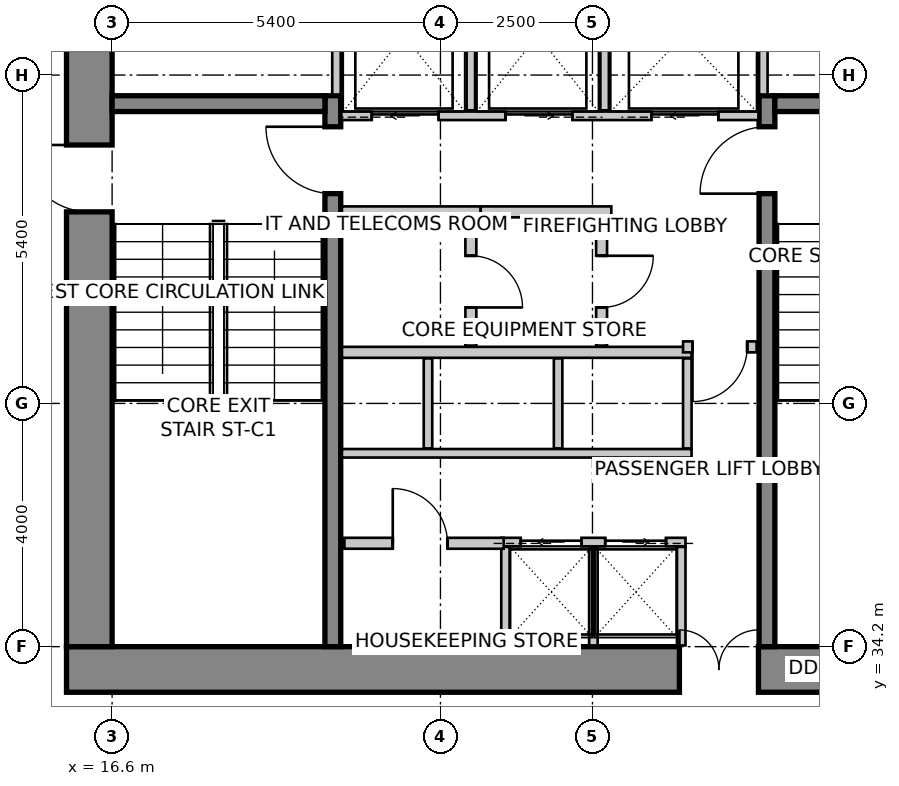
"""IFC4 building model, lengths in metres.
Left out: names, types, materials, properties, quantities, classifications, styles, units other than length and angle.
Written with IfcOpenShell. Run it as: python <this file> out.ifc"""

import sys

from ifc_helpers import new_model, si_unit, direction, frame, frame_2d, origin, place, context, subcontext, project, spatial, rectangle, extrude, source, transform, mapped, element, fill, save


model = new_model("IFC4")
c1 = context("Model", 3, precision=1e-05, world=origin(), true_north=direction((0.0, 1.0)))
c2 = subcontext(c1, "Body", "Model", "MODEL_VIEW")
j1 = project(units=[si_unit("LENGTHUNIT", "METRE"), si_unit("PLANEANGLEUNIT", "RADIAN")], contexts=[c1])
p1 = place(None, origin())
s1 = spatial("IfcSite", under=j1, at=p1, CompositionType="ELEMENT")
p2 = place(p1, origin())
s2 = spatial("IfcBuilding", under=s1, at=p2, CompositionType="ELEMENT")
p3 = place(p2, frame((0.0, 0.0, 114.2)))
s3 = spatial("IfcBuildingStorey", under=s2, at=p3, CompositionType="ELEMENT", Elevation=114.2)
p4 = place(p3, frame((15.85, 33.825, 0.0), z_axis=(0.0, 0.0, 1.0), x_axis=(1.0, 0.0, 0.0)))
e1 = element("IfcWall", 1, at=p4, inside=s3, PredefinedType="SHEAR", context=c2, shape_type="SweptSolid", body=[
    extrude(rectangle(XDim=15.9, YDim=0.75, at=frame_2d((7.95, 0.0))), origin(), (0.0, 0.0, 1.0), 3.6),
])
m1 = source(origin(), c2, "Body", "SweptSolid", [
    extrude(rectangle(XDim=1.3, YDim=2.15, at=frame_2d((0.65, 1.075))), frame((0.0, 0.385, 0.0), z_axis=(0.0, -1.0, 0.0), x_axis=(1.0, 0.0, 0.0)), (0.0, 0.0, 1.0), 0.77),
])
p5 = place(p4, frame((10.08, 0.0, 0.0)))
e2 = element("IfcOpeningElement", 2, at=p5, cuts=e1, PredefinedType="OPENING", context=c2, shape_type="MappedRepresentation", body=[
    mapped(m1, transform((0.0, 0.0, 0.0), scale=1.0)),
])
p6 = place(p3, frame((16.225, 34.2, 0.0), z_axis=(0.0, 0.0, 1.0), x_axis=(0.0, 1.0, 0.0)))
e3 = element("IfcWall", 3, at=p6, inside=s3, PredefinedType="SHEAR", context=c2, shape_type="SweptSolid", body=[
    extrude(rectangle(XDim=11.4, YDim=0.75, at=frame_2d((5.7, 0.0))), origin(), (0.0, 0.0, 1.0), 3.6),
])
m2 = source(origin(), c2, "Body", "SweptSolid", [
    extrude(rectangle(XDim=1.1, YDim=2.15, at=frame_2d((0.55, 1.075))), frame((0.0, 0.385, 0.0), z_axis=(0.0, -1.0, 0.0), x_axis=(1.0, 0.0, 0.0)), (0.0, 0.0, 1.0), 0.77),
])
p7 = place(p6, frame((7.15, 0.0, 0.0)))
e4 = element("IfcOpeningElement", 4, at=p7, cuts=e3, PredefinedType="OPENING", context=c2, shape_type="MappedRepresentation", body=[
    mapped(m2, transform((0.0, 0.0, 0.0), scale=1.0)),
])
p8 = place(p3, frame((20.23, 34.2, 0.0), z_axis=(0.0, 0.0, 1.0), x_axis=(0.0, 1.0, 0.0)))
e5 = element("IfcWall", 5, at=p8, inside=s3, PredefinedType="SHEAR", context=c2, shape_type="SweptSolid", body=[
    extrude(rectangle(XDim=9.06, YDim=0.26, at=frame_2d((4.53, 0.0))), origin(), (0.0, 0.0, 1.0), 3.6),
])
m3 = source(origin(), c2, "Body", "SweptSolid", [
    extrude(rectangle(XDim=1.1, YDim=2.15, at=frame_2d((0.55, 1.075))), frame((0.0, 0.14, 0.0), z_axis=(0.0, -1.0, 0.0), x_axis=(1.0, 0.0, 0.0)), (0.0, 0.0, 1.0), 0.28),
])
p9 = place(p8, frame((7.45, 0.0, 0.0)))
e6 = element("IfcOpeningElement", 6, at=p9, cuts=e5, PredefinedType="OPENING", context=c2, shape_type="MappedRepresentation", body=[
    mapped(m3, transform((0.0, 0.0, 0.0), scale=1.0)),
])
p10 = place(p3, frame((27.37, 34.2, 0.0), z_axis=(0.0, 0.0, 1.0), x_axis=(0.0, 1.0, 0.0)))
e7 = element("IfcWall", 7, at=p10, inside=s3, PredefinedType="SHEAR", context=c2, shape_type="SweptSolid", body=[
    extrude(rectangle(XDim=9.06, YDim=0.26, at=frame_2d((4.53, 0.0))), origin(), (0.0, 0.0, 1.0), 3.6),
])
p11 = place(p10, frame((7.45, 0.0, 0.0)))
e8 = element("IfcOpeningElement", 8, at=p11, cuts=e7, PredefinedType="OPENING", context=c2, shape_type="MappedRepresentation", body=[
    mapped(m3, transform((0.0, 0.0, 0.0), scale=1.0)),
])
for number, where, z_axis, x_axis in (
    (9, (16.6, 43.13, 0.0), (0.0, 0.0, 1.0), (1.0, 0.0, 0.0)),
    (10, (27.5, 43.13, 0.0), (0.0, 0.0, 1.0), (1.0, 0.0, 0.0)),
):
    element("IfcWall", number, at=place(p3, frame(where, z_axis=z_axis, x_axis=x_axis)), inside=s3, PredefinedType="SHEAR", context=c2, shape_type="SweptSolid", body=[
        extrude(rectangle(XDim=3.5, YDim=0.26, at=frame_2d((1.75, 0.0))), origin(), (0.0, 0.0, 1.0), 3.6),
    ])
p12 = place(p3, frame((20.37, 42.93, 0.0), z_axis=(0.0, 0.0, 1.0), x_axis=(1.0, 0.0, 0.0)))
e11 = element("IfcWall", 11, at=p12, inside=s3, PredefinedType="SOLIDWALL", context=c2, shape_type="SweptSolid", body=[
    extrude(rectangle(XDim=6.86, YDim=0.14, at=frame_2d((3.43, 0.0))), origin(), (0.0, 0.0, 1.0), 3.35),
])
m4 = source(origin(), c2, "Body", "SweptSolid", [
    extrude(rectangle(XDim=1.1, YDim=2.15, at=frame_2d((0.55, 1.075))), frame((0.0, 0.08, 0.0), z_axis=(0.0, -1.0, 0.0), x_axis=(1.0, 0.0, 0.0)), (0.0, 0.0, 1.0), 0.16),
])
p13 = place(p12, frame((0.5, 0.0, 0.0)))
e12 = element("IfcOpeningElement", 12, at=p13, cuts=e11, PredefinedType="OPENING", context=c2, shape_type="MappedRepresentation", body=[
    mapped(m4, transform((0.0, 0.0, 0.0), scale=1.0)),
])
p14 = place(p12, frame((2.7, 0.0, 0.0)))
e13 = element("IfcOpeningElement", 13, at=p14, cuts=e11, PredefinedType="OPENING", context=c2, shape_type="MappedRepresentation", body=[
    mapped(m4, transform((0.0, 0.0, 0.0), scale=1.0)),
])
p15 = place(p12, frame((5.1, 0.0, 0.0)))
e14 = element("IfcOpeningElement", 14, at=p15, cuts=e11, PredefinedType="OPENING", context=c2, shape_type="MappedRepresentation", body=[
    mapped(m4, transform((0.0, 0.0, 0.0), scale=1.0)),
])
for number, where, z_axis, x_axis in (
    (15, (20.29, 43.28, 0.0), (0.0, 0.0, 1.0), (0.0, 1.0, 0.0)),
    (16, (27.31, 43.28, 0.0), (0.0, 0.0, 1.0), (0.0, 1.0, 0.0)),
):
    element("IfcWall", number, at=place(p3, frame(where, z_axis=z_axis, x_axis=x_axis)), inside=s3, PredefinedType="SOLIDWALL", context=c2, shape_type="SweptSolid", body=[
        extrude(rectangle(XDim=2.3, YDim=0.14, at=frame_2d((1.15, 0.0))), origin(), (0.0, 0.0, 1.0), 3.35),
    ])
for number, where, z_axis, x_axis in (
    (17, (22.5, 43.02, 0.0), (0.0, 0.0, 1.0), (0.0, 1.0, 0.0)),
    (18, (24.7, 43.02, 0.0), (0.0, 0.0, 1.0), (0.0, 1.0, 0.0)),
):
    element("IfcWall", number, at=place(p3, frame(where, z_axis=z_axis, x_axis=x_axis)), inside=s3, PredefinedType="SOLIDWALL", context=c2, shape_type="SweptSolid", body=[
        extrude(rectangle(XDim=2.56, YDim=0.14, at=frame_2d((1.28, 0.0))), origin(), (0.0, 0.0, 1.0), 3.35),
    ])
p16 = place(p3, frame((23.0, 35.92, 0.0), z_axis=(0.0, 0.0, 1.0), x_axis=(1.0, 0.0, 0.0)))
e19 = element("IfcWall", 19, at=p16, inside=s3, PredefinedType="SOLIDWALL", context=c2, shape_type="SweptSolid", body=[
    extrude(rectangle(XDim=3.03, YDim=0.14, at=frame_2d((1.515, 0.0))), origin(), (0.0, 0.0, 1.0), 3.35),
])
m5 = source(origin(), c2, "Body", "SweptSolid", [
    extrude(rectangle(XDim=1.0, YDim=2.15, at=frame_2d((0.5, 1.075))), frame((0.0, 0.08, 0.0), z_axis=(0.0, -1.0, 0.0), x_axis=(1.0, 0.0, 0.0)), (0.0, 0.0, 1.0), 0.16),
])
p17 = place(p16, frame((0.32, 0.0, 0.0)))
e20 = element("IfcOpeningElement", 20, at=p17, cuts=e19, PredefinedType="OPENING", context=c2, shape_type="MappedRepresentation", body=[
    mapped(m5, transform((0.0, 0.0, 0.0), scale=1.0)),
])
p18 = place(p16, frame((1.71, 0.0, 0.0)))
e21 = element("IfcOpeningElement", 21, at=p18, cuts=e19, PredefinedType="OPENING", context=c2, shape_type="MappedRepresentation", body=[
    mapped(m5, transform((0.0, 0.0, 0.0), scale=1.0)),
])
for number, where, z_axis, x_axis in (
    (22, (25.96, 34.22, 0.0), (0.0, 0.0, 1.0), (0.0, 1.0, 0.0)),
    (23, (23.07, 34.22, 0.0), (0.0, 0.0, 1.0), (0.0, 1.0, 0.0)),
    (24, (24.515, 34.22, 0.0), (0.0, 0.0, 1.0), (0.0, 1.0, 0.0)),
):
    element("IfcWall", number, at=place(p3, frame(where, z_axis=z_axis, x_axis=x_axis)), inside=s3, PredefinedType="SOLIDWALL", context=c2, shape_type="SweptSolid", body=[
        extrude(rectangle(XDim=1.62, YDim=0.14, at=frame_2d((0.81, 0.0))), origin(), (0.0, 0.0, 1.0), 2.642),
    ])
p19 = place(p3, frame((20.38, 37.38, 0.0), z_axis=(0.0, 0.0, 1.0), x_axis=(1.0, 0.0, 0.0)))
e25 = element("IfcWall", 25, at=p19, inside=s3, PredefinedType="SOLIDWALL", context=c2, shape_type="SweptSolid", body=[
    extrude(rectangle(XDim=5.75, YDim=0.14, at=frame_2d((2.875, 0.0))), origin(), (0.0, 0.0, 1.0), 3.35),
])
p20 = place(p3, frame((20.38, 39.04, 0.0), z_axis=(0.0, 0.0, 1.0), x_axis=(1.0, 0.0, 0.0)))
e26 = element("IfcWall", 26, at=p20, inside=s3, PredefinedType="SOLIDWALL", context=c2, shape_type="SweptSolid", body=[
    extrude(rectangle(XDim=5.75, YDim=0.18, at=frame_2d((2.875, 0.0))), origin(), (0.0, 0.0, 1.0), 3.35),
])
for number, where, z_axis, x_axis in (
    (27, (26.06, 37.46, 0.0), (0.0, 0.0, 1.0), (0.0, 1.0, 0.0)),
    (28, (21.795, 37.46, 0.0), (0.0, 0.0, 1.0), (0.0, 1.0, 0.0)),
    (29, (23.935, 37.46, 0.0), (0.0, 0.0, 1.0), (0.0, 1.0, 0.0)),
):
    element("IfcWall", number, at=place(p3, frame(where, z_axis=z_axis, x_axis=x_axis)), inside=s3, PredefinedType="SOLIDWALL", context=c2, shape_type="SweptSolid", body=[
        extrude(rectangle(XDim=1.48, YDim=0.14, at=frame_2d((0.74, 0.0))), origin(), (0.0, 0.0, 1.0), 3.35),
    ])
p21 = place(p3, frame((22.66, 41.35, 0.0), z_axis=(0.0, 0.0, 1.0), x_axis=(-1.0, 0.0, 0.0)))
e30 = element("IfcWall", 30, at=p21, inside=s3, PredefinedType="PARTITIONING", context=c2, shape_type="SweptSolid", body=[
    extrude(rectangle(XDim=2.28, YDim=0.18, at=frame_2d((1.14, 0.0))), origin(), (0.0, 0.0, 1.0), 3.35),
])
p22 = place(p3, frame((24.81, 41.35, 0.0), z_axis=(0.0, 0.0, 1.0), x_axis=(-1.0, 0.0, 0.0)))
e31 = element("IfcWall", 31, at=p22, inside=s3, PredefinedType="PARTITIONING", context=c2, shape_type="SweptSolid", body=[
    extrude(rectangle(XDim=2.148, YDim=0.18, at=frame_2d((1.074, 0.0))), origin(), (0.0, 0.0, 1.0), 3.35),
])
p23 = place(p3, frame((22.5, 41.256, 0.0), z_axis=(0.0, 0.0, 1.0), x_axis=(0.0, -1.0, 0.0)))
e32 = element("IfcWall", 32, at=p23, inside=s3, PredefinedType="PARTITIONING", context=c2, shape_type="SweptSolid", body=[
    extrude(rectangle(XDim=2.106, YDim=0.18, at=frame_2d((1.053, 0.0))), origin(), (0.0, 0.0, 1.0), 3.35),
])
m6 = source(origin(), c2, "Body", "SweptSolid", [
    extrude(rectangle(XDim=0.85, YDim=2.15, at=frame_2d((0.425, 1.075))), frame((0.0, 0.1, 0.0), z_axis=(0.0, -1.0, 0.0), x_axis=(1.0, 0.0, 0.0)), (0.0, 0.0, 1.0), 0.2),
])
p24 = place(p23, frame((0.628, 0.0, 0.0)))
e33 = element("IfcOpeningElement", 33, at=p24, cuts=e32, PredefinedType="OPENING", context=c2, shape_type="MappedRepresentation", body=[
    mapped(m6, transform((0.0, 0.0, 0.0), scale=1.0)),
])
p25 = place(p3, frame((24.65, 41.256, 0.0), z_axis=(0.0, 0.0, 1.0), x_axis=(0.0, -1.0, 0.0)))
e34 = element("IfcWall", 34, at=p25, inside=s3, PredefinedType="PARTITIONING", context=c2, shape_type="SweptSolid", body=[
    extrude(rectangle(XDim=2.106, YDim=0.18, at=frame_2d((1.053, 0.0))), origin(), (0.0, 0.0, 1.0), 3.35),
])
p26 = place(p25, frame((0.628, 0.0, 0.0)))
e35 = element("IfcOpeningElement", 35, at=p26, cuts=e34, PredefinedType="OPENING", context=c2, shape_type="MappedRepresentation", body=[
    mapped(m6, transform((0.0, 0.0, 0.0), scale=1.0)),
])
p27 = place(p3, frame((27.2, 39.13, 0.0), z_axis=(0.0, 0.0, 1.0), x_axis=(-1.0, 0.0, 0.0)))
e36 = element("IfcWall", 36, at=p27, inside=s3, PredefinedType="PARTITIONING", context=c2, shape_type="SweptSolid", body=[
    extrude(rectangle(XDim=1.21, YDim=0.18, at=frame_2d((0.605, 0.0))), origin(), (0.0, 0.0, 1.0), 3.35),
])
m7 = source(origin(), c2, "Body", "SweptSolid", [
    extrude(rectangle(XDim=0.9, YDim=2.15, at=frame_2d((0.45, 1.075))), frame((0.0, 0.1, 0.0), z_axis=(0.0, -1.0, 0.0), x_axis=(1.0, 0.0, 0.0)), (0.0, 0.0, 1.0), 0.2),
])
p28 = place(p27, frame((0.155, 0.0, 0.0)))
e37 = element("IfcOpeningElement", 37, at=p28, cuts=e36, PredefinedType="OPENING", context=c2, shape_type="MappedRepresentation", body=[
    mapped(m7, transform((0.0, 0.0, 0.0), scale=1.0)),
])
p29 = place(p3, frame((20.42, 35.9, 0.0), z_axis=(0.0, 0.0, 1.0), x_axis=(1.0, 0.0, 0.0)))
e38 = element("IfcWall", 38, at=p29, inside=s3, PredefinedType="PARTITIONING", context=c2, shape_type="SweptSolid", body=[
    extrude(rectangle(XDim=2.62, YDim=0.18, at=frame_2d((1.31, 0.0))), origin(), (0.0, 0.0, 1.0), 3.35),
])
p30 = place(p29, frame((0.796, 0.0, 0.0)))
e39 = element("IfcOpeningElement", 39, at=p30, cuts=e38, PredefinedType="OPENING", context=c2, shape_type="MappedRepresentation", body=[
    mapped(m7, transform((0.0, 0.0, 0.0), scale=1.0)),
])
m8 = source(origin(), c2, "Body", "SweptSolid", [
    extrude(rectangle(XDim=1.1, YDim=2.15, at=frame_2d((0.55, 1.075))), frame((0.0, 0.025, 0.0), z_axis=(0.0, -1.0, 0.0), x_axis=(1.0, 0.0, 0.0)), (0.0, 0.0, 1.0), 0.05),
])
p31 = place(p13, origin())
e40 = element("IfcDoor", 40, at=p31, inside=s3, OperationType="SLIDING_TO_LEFT", PredefinedType="DOOR", context=c2, shape_type="MappedRepresentation", body=[
    mapped(m8, transform((0.0, 0.0, 0.0), scale=1.0)),
])
fill(e12, e40)
p32 = place(p14, origin())
e41 = element("IfcDoor", 41, at=p32, inside=s3, OperationType="SLIDING_TO_RIGHT", PredefinedType="DOOR", context=c2, shape_type="MappedRepresentation", body=[
    mapped(m8, transform((0.0, 0.0, 0.0), scale=1.0)),
])
fill(e13, e41)
m9 = source(origin(), c2, "Body", "SweptSolid", [
    extrude(rectangle(XDim=1.1, YDim=2.15, at=frame_2d((0.55, 1.075))), frame((0.0, 0.025, 0.0), z_axis=(0.0, -1.0, 0.0), x_axis=(1.0, 0.0, 0.0)), (0.0, 0.0, 1.0), 0.05),
])
p33 = place(p15, origin())
e42 = element("IfcDoor", 42, at=p33, inside=s3, OperationType="SLIDING_TO_LEFT", PredefinedType="DOOR", context=c2, shape_type="MappedRepresentation", body=[
    mapped(m9, transform((0.0, 0.0, 0.0), scale=1.0)),
])
fill(e14, e42)
m10 = source(origin(), c2, "Body", "SweptSolid", [
    extrude(rectangle(XDim=1.0, YDim=2.15, at=frame_2d((0.5, 1.075))), frame((0.0, 0.025, 0.0), z_axis=(0.0, -1.0, 0.0), x_axis=(1.0, 0.0, 0.0)), (0.0, 0.0, 1.0), 0.05),
])
p34 = place(p17, origin())
e43 = element("IfcDoor", 43, at=p34, inside=s3, OperationType="SLIDING_TO_LEFT", PredefinedType="DOOR", context=c2, shape_type="MappedRepresentation", body=[
    mapped(m10, transform((0.0, 0.0, 0.0), scale=1.0)),
])
fill(e20, e43)
p35 = place(p18, origin())
e44 = element("IfcDoor", 44, at=p35, inside=s3, OperationType="SLIDING_TO_RIGHT", PredefinedType="DOOR", context=c2, shape_type="MappedRepresentation", body=[
    mapped(m10, transform((0.0, 0.0, 0.0), scale=1.0)),
])
fill(e21, e44)
m11 = source(origin(), c2, "Body", "SweptSolid", [
    extrude(rectangle(XDim=1.1, YDim=2.15, at=frame_2d((0.55, 1.075))), frame((0.0, 0.025, 0.0), z_axis=(0.0, -1.0, 0.0), x_axis=(1.0, 0.0, 0.0)), (0.0, 0.0, 1.0), 0.05),
])
p36 = place(p9, origin())
e45 = element("IfcDoor", 45, at=p36, inside=s3, OperationType="SINGLE_SWING_RIGHT", PredefinedType="DOOR", context=c2, shape_type="MappedRepresentation", body=[
    mapped(m11, transform((0.0, 0.0, 0.0), scale=1.0)),
])
fill(e6, e45)
p37 = place(p11, origin())
e46 = element("IfcDoor", 46, at=p37, inside=s3, OperationType="SINGLE_SWING_LEFT", PredefinedType="DOOR", context=c2, shape_type="MappedRepresentation", body=[
    mapped(m11, transform((0.0, 0.0, 0.0), scale=1.0)),
])
fill(e8, e46)
p38 = place(p7, origin())
e47 = element("IfcDoor", 47, at=p38, inside=s3, OperationType="SINGLE_SWING_RIGHT", PredefinedType="DOOR", context=c2, shape_type="MappedRepresentation", body=[
    mapped(m11, transform((0.0, 0.0, 0.0), scale=1.0)),
])
fill(e4, e47)
m12 = source(origin(), c2, "Body", "SweptSolid", [
    extrude(rectangle(XDim=1.3, YDim=2.15, at=frame_2d((0.65, 1.075))), frame((0.0, 0.025, 0.0), z_axis=(0.0, -1.0, 0.0), x_axis=(1.0, 0.0, 0.0)), (0.0, 0.0, 1.0), 0.05),
])
p39 = place(p5, origin())
e48 = element("IfcDoor", 48, at=p39, inside=s3, OperationType="DOUBLE_DOOR_SINGLE_SWING", PredefinedType="DOOR", context=c2, shape_type="MappedRepresentation", body=[
    mapped(m12, transform((0.0, 0.0, 0.0), scale=1.0)),
])
fill(e2, e48)
m13 = source(origin(), c2, "Body", "SweptSolid", [
    extrude(rectangle(XDim=0.85, YDim=2.15, at=frame_2d((0.425, 1.075))), frame((0.0, 0.025, 0.0), z_axis=(0.0, -1.0, 0.0), x_axis=(1.0, 0.0, 0.0)), (0.0, 0.0, 1.0), 0.05),
])
p40 = place(p24, origin())
e49 = element("IfcDoor", 49, at=p40, inside=s3, OperationType="SINGLE_SWING_RIGHT", PredefinedType="DOOR", context=c2, shape_type="MappedRepresentation", body=[
    mapped(m13, transform((0.0, 0.0, 0.0), scale=1.0)),
])
fill(e33, e49)
p41 = place(p26, origin())
e50 = element("IfcDoor", 50, at=p41, inside=s3, OperationType="SINGLE_SWING_LEFT", PredefinedType="DOOR", context=c2, shape_type="MappedRepresentation", body=[
    mapped(m13, transform((0.0, 0.0, 0.0), scale=1.0)),
])
fill(e35, e50)
m14 = source(origin(), c2, "Body", "SweptSolid", [
    extrude(rectangle(XDim=0.9, YDim=2.15, at=frame_2d((0.45, 1.075))), frame((0.0, 0.025, 0.0), z_axis=(0.0, -1.0, 0.0), x_axis=(1.0, 0.0, 0.0)), (0.0, 0.0, 1.0), 0.05),
])
p42 = place(p28, origin())
e51 = element("IfcDoor", 51, at=p42, inside=s3, OperationType="SINGLE_SWING_RIGHT", PredefinedType="DOOR", context=c2, shape_type="MappedRepresentation", body=[
    mapped(m14, transform((0.0, 0.0, 0.0), scale=1.0)),
])
fill(e37, e51)
p43 = place(p30, origin())
e52 = element("IfcDoor", 52, at=p43, inside=s3, OperationType="SINGLE_SWING_LEFT", PredefinedType="DOOR", context=c2, shape_type="MappedRepresentation", body=[
    mapped(m14, transform((0.0, 0.0, 0.0), scale=1.0)),
])
fill(e39, e52)
save(model, sys.argv[1])
